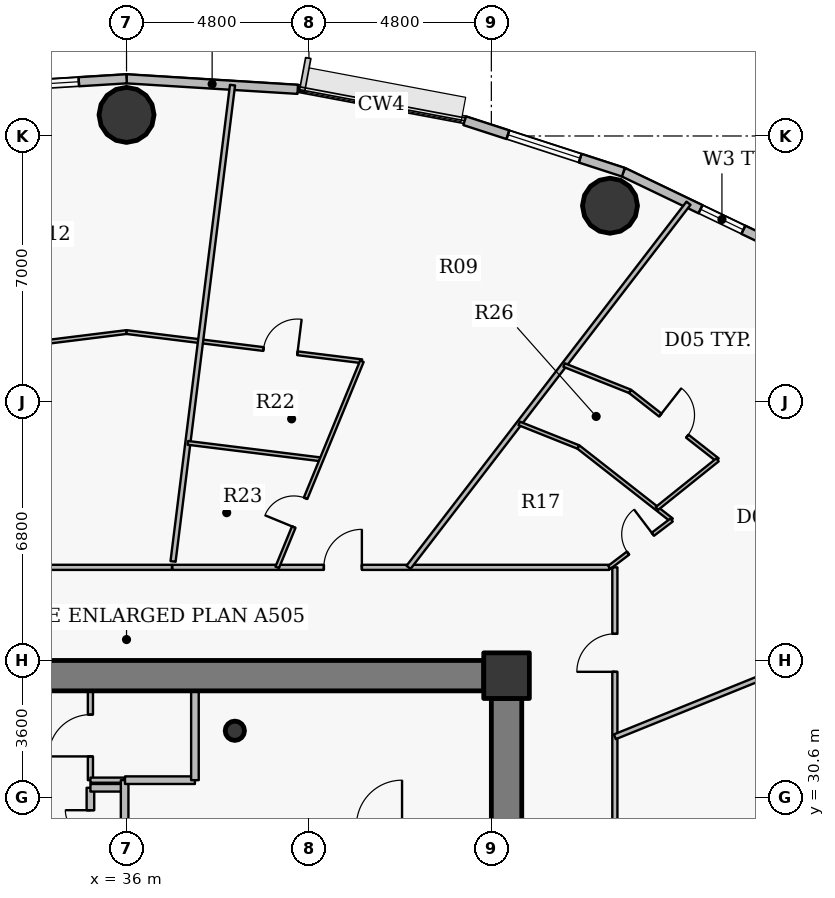
"""IFC4 building model, lengths in metres.
Left out: names, types, materials, properties, quantities, classifications, styles, units other than length and angle.
Written with IfcOpenShell. Run it as: python <this file> out.ifc"""

import sys

from ifc_helpers import new_model, si_unit, direction, frame, frame_2d, origin, origin_2d, place, context, subcontext, project, spatial, rectangle, hollow_circle, extrude, source, transform, mapped, element, fill, save


model = new_model("IFC4")
c1 = context("Model", 3, precision=1e-05, world=origin(), true_north=direction((0.0, 1.0)))
c2 = subcontext(c1, "Body", "Model", "MODEL_VIEW")
j1 = project(units=[si_unit("LENGTHUNIT", "METRE"), si_unit("PLANEANGLEUNIT", "RADIAN")], contexts=[c1])
p1 = place(None, origin())
s1 = spatial("IfcSite", under=j1, at=p1, CompositionType="ELEMENT")
p2 = place(p1, origin())
s2 = spatial("IfcBuilding", under=s1, at=p2, CompositionType="ELEMENT")
p3 = place(p2, frame((0.0, 0.0, 104.7)))
s3 = spatial("IfcBuildingStorey", under=s2, at=p3, CompositionType="ELEMENT", Elevation=104.7)
p4 = place(p3, frame((46.0, 33.8, 0.0), z_axis=(0.0, 0.0, 1.0), x_axis=(1.0, 0.0, 0.0)))
e1 = element("IfcColumn", 1, at=p4, inside=s3, PredefinedType="COLUMN", context=c2, shape_type="SweptSolid", body=[
    extrude(rectangle(XDim=1.2, YDim=1.2, at=origin_2d()), origin(), (0.0, 0.0, 1.0), 3.75),
])
p5 = place(p3, frame((38.85, 32.35, 0.0), z_axis=(0.0, 0.0, 1.0), x_axis=(1.0, 0.0, 0.0)))
e2 = element("IfcColumn", 2, at=p5, inside=s3, PredefinedType="COLUMN", context=c2, shape_type="SweptSolid", body=[
    extrude(hollow_circle(Radius=0.254, WallThickness=0.02, at=origin_2d()), origin(), (0.0, 0.0, 1.0), 3.75),
])
p6 = place(p3, frame((26.6, 33.8, 0.0), z_axis=(0.0, 0.0, 1.0), x_axis=(1.0, 0.0, 0.0)))
e3 = element("IfcWall", 3, at=p6, inside=s3, PredefinedType="SHEAR", context=c2, shape_type="SweptSolid", body=[
    extrude(rectangle(XDim=18.8, YDim=0.8, at=frame_2d((9.4, 0.0))), origin(), (0.0, 0.0, 1.0), 2.95),
])
p7 = place(p3, frame((46.0, 33.2, 0.0), z_axis=(0.0, 0.0, 1.0), x_axis=(0.0, -1.0, 0.0)))
e4 = element("IfcWall", 4, at=p7, inside=s3, PredefinedType="SHEAR", context=c2, shape_type="SweptSolid", body=[
    extrude(rectangle(XDim=12.4, YDim=0.8, at=frame_2d((6.2, 0.0))), origin(), (0.0, 0.0, 1.0), 2.95),
])
p8 = place(p7, frame((5.79, 0.0, 0.0)))
e5 = element("IfcOpeningElement", 5, at=p8, cuts=e4, PredefinedType="OPENING", context=c2, shape_type="SweptSolid", body=[
    extrude(rectangle(XDim=0.82, YDim=2.1, at=origin_2d()), frame((0.41, 0.41, 1.05), z_axis=(0.0, -1.0, 0.0), x_axis=(1.0, 0.0, 0.0)), (0.0, 0.0, 1.0), 0.82),
])
for number, where, z_axis, x_axis in (
    (6, (48.722, 46.165, 0.0), (0.0, 0.0, 1.0), (1.0, 0.0, 0.0)),
    (7, (36.0, 48.555, 0.0), (0.0, 0.0, 1.0), (1.0, 0.0, 0.0)),
):
    element("IfcColumn", number, at=place(p3, frame(where, z_axis=z_axis, x_axis=x_axis)), inside=s3, PredefinedType="COLUMN", context=c2, shape_type="SweptSolid", body=[
        extrude(hollow_circle(Radius=0.725, WallThickness=0.042, at=origin_2d()), origin(), (0.0, 0.0, 1.0), 3.75),
    ])
p9 = place(p3, frame((49.074, 47.047, 0.0), z_axis=(0.0, 0.0, 1.0), x_axis=(0.901589935876, -0.432591709962, 0.0)))
e8 = element("IfcWall", 8, at=p9, inside=s3, PredefinedType="SOLIDWALL", context=c2, shape_type="SweptSolid", body=[
    extrude(rectangle(XDim=4.272, YDim=0.24, at=frame_2d((2.136, 0.0))), origin(), (0.0, 0.0, 1.0), 3.5),
])
p10 = place(p9, frame((2.252, 0.0, 0.9)))
e9 = element("IfcOpeningElement", 9, at=p10, cuts=e8, PredefinedType="OPENING", context=c2, shape_type="SweptSolid", body=[
    extrude(rectangle(XDim=1.25, YDim=1.65, at=origin_2d()), frame((0.625, 0.13, 0.825), z_axis=(0.0, -1.0, 0.0), x_axis=(1.0, 0.0, 0.0)), (0.0, 0.0, 1.0), 0.26),
])
p11 = place(p3, frame((44.9, 48.401, 0.0), z_axis=(0.0, 0.0, 1.0), x_axis=(0.951211346073, -0.308540070495, 0.0)))
e10 = element("IfcWall", 10, at=p11, inside=s3, PredefinedType="SOLIDWALL", context=c2, shape_type="SweptSolid", body=[
    extrude(rectangle(XDim=4.388, YDim=0.24, at=frame_2d((2.194, 0.0))), origin(), (0.0, 0.0, 1.0), 3.5),
])
p12 = place(p11, frame((1.194, 0.0, 0.9)))
e11 = element("IfcOpeningElement", 11, at=p12, cuts=e10, PredefinedType="OPENING", context=c2, shape_type="SweptSolid", body=[
    extrude(rectangle(XDim=2.0, YDim=1.75, at=origin_2d()), frame((1.0, 0.13, 0.875), z_axis=(0.0, -1.0, 0.0), x_axis=(1.0, 0.0, 0.0)), (0.0, 0.0, 1.0), 0.26),
])
p13 = place(p3, frame((36.0, 49.505, 0.0), z_axis=(0.0, 0.0, 1.0), x_axis=(0.998107531589, -0.061492726276, 0.0)))
e12 = element("IfcWall", 12, at=p13, inside=s3, PredefinedType="SOLIDWALL", context=c2, shape_type="SweptSolid", body=[
    extrude(rectangle(XDim=4.514, YDim=0.24, at=frame_2d((2.257, 0.0))), origin(), (0.0, 0.0, 1.0), 3.5),
])
p14 = place(p3, frame((31.494, 49.227, 0.0), z_axis=(0.0, 0.0, 1.0), x_axis=(0.998107531589, 0.061492726276, 0.0)))
e13 = element("IfcWall", 13, at=p14, inside=s3, PredefinedType="SOLIDWALL", context=c2, shape_type="SweptSolid", body=[
    extrude(rectangle(XDim=4.514, YDim=0.24, at=frame_2d((2.257, 0.0))), origin(), (0.0, 0.0, 1.0), 3.5),
])
p15 = place(p14, frame((1.257, 0.0, 0.9)))
e14 = element("IfcOpeningElement", 14, at=p15, cuts=e13, PredefinedType="OPENING", context=c2, shape_type="SweptSolid", body=[
    extrude(rectangle(XDim=2.0, YDim=1.75, at=origin_2d()), frame((1.0, 0.13, 0.875), z_axis=(0.0, -1.0, 0.0), x_axis=(1.0, 0.0, 0.0)), (0.0, 0.0, 1.0), 0.26),
])
p16 = place(p3, frame((31.416, 42.272, 0.0), z_axis=(0.0, 0.0, 1.0), x_axis=(0.992393726446, 0.12310439355, 0.0)))
e15 = element("IfcWall", 15, at=p16, inside=s3, PredefinedType="PARTITIONING", context=c2, shape_type="SweptSolid", body=[
    extrude(rectangle(XDim=4.619, YDim=0.1, at=frame_2d((2.31, 0.0))), origin(), (0.0, 0.0, 1.0), 2.935),
])
p17 = place(p3, frame((35.05, 27.25, 0.0), z_axis=(0.0, 0.0, 1.0), x_axis=(0.0, 1.0, 0.0)))
e16 = element("IfcWall", 16, at=p17, inside=s3, PredefinedType="PARTITIONING", context=c2, shape_type="SweptSolid", body=[
    extrude(rectangle(XDim=3.6, YDim=0.2, at=frame_2d((1.8, 0.0))), origin(), (0.0, 0.0, 1.0), 3.5),
])
p18 = place(p17, frame((0.59, 0.0, 0.0)))
e17 = element("IfcOpeningElement", 17, at=p18, cuts=e16, PredefinedType="OPENING", context=c2, shape_type="SweptSolid", body=[
    extrude(rectangle(XDim=0.66, YDim=2.05, at=origin_2d()), frame((0.33, 0.11, 1.025), z_axis=(0.0, -1.0, 0.0), x_axis=(1.0, 0.0, 0.0)), (0.0, 0.0, 1.0), 0.22),
])
p19 = place(p17, frame((2.35, 0.0, 0.0)))
e18 = element("IfcOpeningElement", 18, at=p19, cuts=e16, PredefinedType="OPENING", context=c2, shape_type="SweptSolid", body=[
    extrude(rectangle(XDim=0.66, YDim=2.05, at=origin_2d()), frame((0.33, 0.11, 1.025), z_axis=(0.0, -1.0, 0.0), x_axis=(1.0, 0.0, 0.0)), (0.0, 0.0, 1.0), 0.22),
])
p20 = place(p3, frame((35.05, 30.85, 0.0), z_axis=(0.0, 0.0, 1.0), x_axis=(1.0, 0.0, 0.0)))
e19 = element("IfcWall", 19, at=p20, inside=s3, PredefinedType="PARTITIONING", context=c2, shape_type="SweptSolid", body=[
    extrude(rectangle(XDim=0.9, YDim=0.2, at=frame_2d((0.45, 0.0))), origin(), (0.0, 0.0, 1.0), 3.5),
])
p21 = place(p3, frame((35.05, 31.05, 0.0), z_axis=(0.0, 0.0, 1.0), x_axis=(0.0, 1.0, 0.0)))
e20 = element("IfcWall", 20, at=p21, inside=s3, PredefinedType="PARTITIONING", context=c2, shape_type="SweptSolid", body=[
    extrude(rectangle(XDim=2.35, YDim=0.135, at=frame_2d((1.175, 0.0))), origin(), (0.0, 0.0, 1.0), 3.085),
])
p22 = place(p21, frame((0.625, 0.0, 0.0)))
e21 = element("IfcOpeningElement", 21, at=p22, cuts=e20, PredefinedType="OPENING", context=c2, shape_type="SweptSolid", body=[
    extrude(rectangle(XDim=1.1, YDim=2.15, at=origin_2d()), frame((0.55, 0.078, 1.075), z_axis=(0.0, -1.0, 0.0), x_axis=(1.0, 0.0, 0.0)), (0.0, 0.0, 1.0), 0.155),
])
p23 = place(p3, frame((35.05, 31.05, 0.0), z_axis=(0.0, 0.0, 1.0), x_axis=(1.0, 0.0, 0.0)))
e22 = element("IfcWall", 22, at=p23, inside=s3, PredefinedType="PARTITIONING", context=c2, shape_type="SweptSolid", body=[
    extrude(rectangle(XDim=0.9, YDim=0.135, at=frame_2d((0.45, 0.0))), origin(), (0.0, 0.0, 1.0), 3.5),
])
p24 = place(p3, frame((35.95, 27.25, 0.0), z_axis=(0.0, 0.0, 1.0), x_axis=(0.0, 1.0, 0.0)))
e23 = element("IfcWall", 23, at=p24, inside=s3, PredefinedType="PARTITIONING", context=c2, shape_type="SweptSolid", body=[
    extrude(rectangle(XDim=3.8, YDim=0.2, at=frame_2d((1.9, 0.0))), origin(), (0.0, 0.0, 1.0), 3.5),
])
p25 = place(p3, frame((35.96, 31.05, 0.0), z_axis=(0.0, 0.0, 1.0), x_axis=(1.0, 0.0, 0.0)))
e24 = element("IfcWall", 24, at=p25, inside=s3, PredefinedType="PARTITIONING", context=c2, shape_type="SweptSolid", body=[
    extrude(rectangle(XDim=1.84, YDim=0.2, at=frame_2d((0.92, 0.0))), origin(), (0.0, 0.0, 1.0), 3.5),
])
p26 = place(p3, frame((36.0, 42.841, 0.0), z_axis=(0.0, 0.0, 1.0), x_axis=(0.992393593066, -0.123105468776, 0.0)))
e25 = element("IfcWall", 25, at=p26, inside=s3, PredefinedType="PARTITIONING", context=c2, shape_type="SweptSolid", body=[
    extrude(rectangle(XDim=6.241, YDim=0.1, at=frame_2d((3.121, 0.0))), origin(), (0.0, 0.0, 1.0), 2.935),
])
p27 = place(p26, frame((3.632, 0.0, 0.0)))
e26 = element("IfcOpeningElement", 26, at=p27, cuts=e25, PredefinedType="OPENING", context=c2, shape_type="SweptSolid", body=[
    extrude(rectangle(XDim=0.9, YDim=2.1, at=origin_2d()), frame((0.45, 0.06, 1.05), z_axis=(0.0, -1.0, 0.0), x_axis=(1.0, 0.0, 0.0)), (0.0, 0.0, 1.0), 0.12),
])
p28 = place(p3, frame((37.205, 36.65, 0.0), z_axis=(0.0, 0.0, 1.0), x_axis=(1.0, 0.0, 0.0)))
e27 = element("IfcWall", 27, at=p28, inside=s3, PredefinedType="PARTITIONING", context=c2, shape_type="SweptSolid", body=[
    extrude(rectangle(XDim=11.499, YDim=0.135, at=frame_2d((5.75, 0.0))), origin(), (0.0, 0.0, 1.0), 2.935),
])
p29 = place(p28, frame((3.988, 0.0, 0.0)))
e28 = element("IfcOpeningElement", 28, at=p29, cuts=e27, PredefinedType="OPENING", context=c2, shape_type="SweptSolid", body=[
    extrude(rectangle(XDim=1.0, YDim=2.15, at=origin_2d()), frame((0.5, 0.078, 1.075), z_axis=(0.0, -1.0, 0.0), x_axis=(1.0, 0.0, 0.0)), (0.0, 0.0, 1.0), 0.155),
])
p30 = place(p3, frame((37.224, 36.805, 0.0), z_axis=(0.0, 0.0, 1.0), x_axis=(0.123906262398, 0.992293927291, 0.0)))
e29 = element("IfcWall", 29, at=p30, inside=s3, PredefinedType="PARTITIONING", context=c2, shape_type="SweptSolid", body=[
    extrude(rectangle(XDim=12.63, YDim=0.135, at=frame_2d((6.315, 0.0))), origin(), (0.0, 0.0, 1.0), 2.935),
])
p31 = place(p3, frame((37.614, 39.925, 0.0), z_axis=(0.0, 0.0, 1.0), x_axis=(0.992397148182, -0.123076806427, 0.0)))
e30 = element("IfcWall", 30, at=p31, inside=s3, PredefinedType="PARTITIONING", context=c2, shape_type="SweptSolid", body=[
    extrude(rectangle(XDim=3.545, YDim=0.1, at=frame_2d((1.772, 0.0))), origin(), (0.0, 0.0, 1.0), 3.5),
])
p32 = place(p3, frame((37.8, 31.05, 0.0), z_axis=(0.0, 0.0, 1.0), x_axis=(0.0, 1.0, 0.0)))
e31 = element("IfcWall", 31, at=p32, inside=s3, PredefinedType="PARTITIONING", context=c2, shape_type="SweptSolid", body=[
    extrude(rectangle(XDim=2.35, YDim=0.2, at=frame_2d((1.175, 0.0))), origin(), (0.0, 0.0, 1.0), 3.085),
])
p33 = place(p3, frame((39.965, 36.65, 0.0), z_axis=(0.0, 0.0, 1.0), x_axis=(0.380069011115, 0.924958132452, 0.0)))
e32 = element("IfcWall", 32, at=p33, inside=s3, PredefinedType="PARTITIONING", context=c2, shape_type="SweptSolid", body=[
    extrude(rectangle(XDim=5.863, YDim=0.1, at=frame_2d((2.931, 0.0))), origin(), (0.0, 0.0, 1.0), 3.5),
])
p34 = place(p33, frame((1.145, 0.0, 0.0)))
e33 = element("IfcOpeningElement", 33, at=p34, cuts=e32, PredefinedType="OPENING", context=c2, shape_type="SweptSolid", body=[
    extrude(rectangle(XDim=0.82, YDim=2.1, at=origin_2d()), frame((0.41, 0.06, 1.05), z_axis=(0.0, -1.0, 0.0), x_axis=(1.0, 0.0, 0.0)), (0.0, 0.0, 1.0), 0.12),
])
p35 = place(p3, frame((43.42, 36.65, 0.0), z_axis=(0.0, 0.0, 1.0), x_axis=(0.609572126114, 0.792730611913, 0.0)))
e34 = element("IfcWall", 34, at=p35, inside=s3, PredefinedType="PARTITIONING", context=c2, shape_type="SweptSolid", body=[
    extrude(rectangle(XDim=12.086, YDim=0.135, at=frame_2d((6.043, 0.0))), origin(), (0.0, 0.0, 1.0), 2.935),
])
p36 = place(p3, frame((46.333, 40.437, 0.0), z_axis=(0.0, 0.0, 1.0), x_axis=(0.928817558248, -0.370537371247, 0.0)))
e35 = element("IfcWall", 35, at=p36, inside=s3, PredefinedType="PARTITIONING", context=c2, shape_type="SweptSolid", body=[
    extrude(rectangle(XDim=1.677, YDim=0.1, at=frame_2d((0.839, 0.0))), origin(), (0.0, 0.0, 1.0), 3.085),
])
p37 = place(p3, frame((47.514, 41.973, 0.0), z_axis=(0.0, 0.0, 1.0), x_axis=(0.928809612726, -0.370557287485, 0.0)))
e36 = element("IfcWall", 36, at=p37, inside=s3, PredefinedType="PARTITIONING", context=c2, shape_type="SweptSolid", body=[
    extrude(rectangle(XDim=1.869, YDim=0.1, at=frame_2d((0.935, 0.0))), origin(), (0.0, 0.0, 1.0), 3.5),
])
p38 = place(p3, frame((47.891, 39.816, 0.0), z_axis=(0.0, 0.0, 1.0), x_axis=(0.787339621997, -0.616519520887, 0.0)))
e37 = element("IfcWall", 37, at=p38, inside=s3, PredefinedType="PARTITIONING", context=c2, shape_type="SweptSolid", body=[
    extrude(rectangle(XDim=3.116, YDim=0.1, at=frame_2d((1.558, 0.0))), origin(), (0.0, 0.0, 1.0), 2.935),
])
p39 = place(p3, frame((48.704, 36.65, 0.0), z_axis=(0.0, 0.0, 1.0), x_axis=(0.796299280247, 0.604902848628, 0.0)))
e38 = element("IfcWall", 38, at=p39, inside=s3, PredefinedType="PARTITIONING", context=c2, shape_type="SweptSolid", body=[
    extrude(rectangle(XDim=2.059, YDim=0.1, at=frame_2d((1.029, 0.0))), origin(), (0.0, 0.0, 1.0), 2.935),
])
p40 = place(p39, frame((0.619, 0.0, 0.0)))
e39 = element("IfcOpeningElement", 39, at=p40, cuts=e38, PredefinedType="OPENING", context=c2, shape_type="SweptSolid", body=[
    extrude(rectangle(XDim=0.82, YDim=2.1, at=origin_2d()), frame((0.41, 0.06, 1.05), z_axis=(0.0, -1.0, 0.0), x_axis=(1.0, 0.0, 0.0)), (0.0, 0.0, 1.0), 0.12),
])
p41 = place(p3, frame((48.85, 17.35, 0.0), z_axis=(0.0, 0.0, 1.0), x_axis=(0.0, 1.0, 0.0)))
e40 = element("IfcWall", 40, at=p41, inside=s3, PredefinedType="PARTITIONING", context=c2, shape_type="SweptSolid", body=[
    extrude(rectangle(XDim=19.3, YDim=0.135, at=frame_2d((9.65, 0.0))), origin(), (0.0, 0.0, 1.0), 2.935),
])
p42 = place(p41, frame((16.551, 0.0, 0.0)))
e41 = element("IfcOpeningElement", 41, at=p42, cuts=e40, PredefinedType="OPENING", context=c2, shape_type="SweptSolid", body=[
    extrude(rectangle(XDim=1.0, YDim=2.15, at=origin_2d()), frame((0.5, 0.078, 1.075), z_axis=(0.0, -1.0, 0.0), x_axis=(1.0, 0.0, 0.0)), (0.0, 0.0, 1.0), 0.155),
])
p43 = place(p41, frame((8.753, 0.0, 0.0)))
e42 = element("IfcOpeningElement", 42, at=p43, cuts=e40, PredefinedType="OPENING", context=c2, shape_type="SweptSolid", body=[
    extrude(rectangle(XDim=1.0, YDim=2.15, at=origin_2d()), frame((0.5, 0.078, 1.075), z_axis=(0.0, -1.0, 0.0), x_axis=(1.0, 0.0, 0.0)), (0.0, 0.0, 1.0), 0.155),
])
p44 = place(p3, frame((48.85, 32.192, 0.0), z_axis=(0.0, 0.0, 1.0), x_axis=(0.927181163505, 0.374613253958, 0.0)))
e43 = element("IfcWall", 43, at=p44, inside=s3, PredefinedType="PARTITIONING", context=c2, shape_type="SweptSolid", body=[
    extrude(rectangle(XDim=13.706, YDim=0.135, at=frame_2d((6.853, 0.0))), origin(), (0.0, 0.0, 1.0), 2.935),
])
p45 = place(p3, frame((49.25, 41.28, 0.0), z_axis=(0.0, 0.0, 1.0), x_axis=(0.787360471536, -0.616492893602, 0.0)))
e44 = element("IfcWall", 44, at=p45, inside=s3, PredefinedType="PARTITIONING", context=c2, shape_type="SweptSolid", body=[
    extrude(rectangle(XDim=2.923, YDim=0.1, at=frame_2d((1.462, 0.0))), origin(), (0.0, 0.0, 1.0), 3.5),
])
p46 = place(p45, frame((1.012, 0.0, 0.0)))
e45 = element("IfcOpeningElement", 45, at=p46, cuts=e44, PredefinedType="OPENING", context=c2, shape_type="SweptSolid", body=[
    extrude(rectangle(XDim=0.9, YDim=2.1, at=origin_2d()), frame((0.45, 0.06, 1.05), z_axis=(0.0, -1.0, 0.0), x_axis=(1.0, 0.0, 0.0)), (0.0, 0.0, 1.0), 0.12),
])
p47 = place(p3, frame((49.956, 38.198, 0.0), z_axis=(0.0, 0.0, 1.0), x_axis=(0.78000622602, 0.625771753413, 0.0)))
e46 = element("IfcWall", 46, at=p47, inside=s3, PredefinedType="PARTITIONING", context=c2, shape_type="SweptSolid", body=[
    extrude(rectangle(XDim=2.045, YDim=0.1, at=frame_2d((1.022, 0.0))), origin(), (0.0, 0.0, 1.0), 3.085),
])
p48 = place(p3, frame((33.533, 36.65, 0.0), z_axis=(0.0, 0.0, 1.0), x_axis=(1.0, 0.0, 0.0)))
e47 = element("IfcWall", 47, at=p48, inside=s3, PredefinedType="PARTITIONING", context=c2, shape_type="SweptSolid", body=[
    extrude(rectangle(XDim=3.662, YDim=0.135, at=frame_2d((1.831, 0.0))), origin(), (0.0, 0.0, 1.0), 2.935),
])
p49 = place(p3, frame((46.4, 34.2, 0.0), z_axis=(0.0, 0.0, 1.0), x_axis=(-1.0, 0.0, 0.0)))
e48 = element("IfcWall", 48, at=p49, inside=s3, PredefinedType="PARTITIONING", context=c2, shape_type="SweptSolid", body=[
    extrude(rectangle(XDim=0.99, YDim=0.135, at=frame_2d((0.495, 0.0))), origin(), (0.0, 0.0, 1.0), 2.935),
])
p50 = place(p3, frame((46.4, 33.21, 0.0), z_axis=(0.0, 0.0, 1.0), x_axis=(0.0, 1.0, 0.0)))
e49 = element("IfcWall", 49, at=p50, inside=s3, PredefinedType="PARTITIONING", context=c2, shape_type="SweptSolid", body=[
    extrude(rectangle(XDim=0.683, YDim=0.135, at=frame_2d((0.341, 0.0))), origin(), (0.0, 0.0, 1.0), 3.5),
])
m1 = source(origin(), c2, "Body", "SweptSolid", [
    extrude(rectangle(XDim=1.25, YDim=1.65, at=origin_2d()), frame((0.625, 0.03, 0.825), z_axis=(0.0, -1.0, 0.0), x_axis=(1.0, 0.0, 0.0)), (0.0, 0.0, 1.0), 0.06),
])
p51 = place(p10, origin())
e50 = element("IfcWindow", 50, at=p51, inside=s3, PartitioningType="SINGLE_PANEL", PredefinedType="WINDOW", context=c2, shape_type="MappedRepresentation", body=[
    mapped(m1, transform((0.0, 0.0, 0.0), x_axis=(1.0, 0.0, 0.0), y_axis=(0.0, 1.0, 0.0), z_axis=(0.0, 0.0, 1.0), scale=1.0)),
])
fill(e9, e50)
m2 = source(origin(), c2, "Body", "SweptSolid", [
    extrude(rectangle(XDim=2.0, YDim=1.75, at=origin_2d()), frame((1.0, 0.03, 0.875), z_axis=(0.0, -1.0, 0.0), x_axis=(1.0, 0.0, 0.0)), (0.0, 0.0, 1.0), 0.06),
])
p52 = place(p12, origin())
e51 = element("IfcWindow", 51, at=p52, inside=s3, PartitioningType="DOUBLE_PANEL_VERTICAL", PredefinedType="WINDOW", context=c2, shape_type="MappedRepresentation", body=[
    mapped(m2, transform((0.0, 0.0, 0.0), x_axis=(1.0, 0.0, 0.0), y_axis=(0.0, 1.0, 0.0), z_axis=(0.0, 0.0, 1.0), scale=1.0)),
])
fill(e11, e51)
p53 = place(p15, origin())
e52 = element("IfcWindow", 52, at=p53, inside=s3, PartitioningType="DOUBLE_PANEL_VERTICAL", PredefinedType="WINDOW", context=c2, shape_type="MappedRepresentation", body=[
    mapped(m2, transform((0.0, 0.0, 0.0), x_axis=(1.0, 0.0, 0.0), y_axis=(0.0, 1.0, 0.0), z_axis=(0.0, 0.0, 1.0), scale=1.0)),
])
fill(e14, e52)
m3 = source(origin(), c2, "Body", "SweptSolid", [
    extrude(rectangle(XDim=1.0, YDim=2.15, at=origin_2d()), frame((0.5, 0.025, 1.075), z_axis=(0.0, -1.0, 0.0), x_axis=(1.0, 0.0, 0.0)), (0.0, 0.0, 1.0), 0.05),
])
p54 = place(p42, origin())
e53 = element("IfcDoor", 53, at=p54, inside=s3, OperationType="SINGLE_SWING_LEFT", PredefinedType="DOOR", context=c2, shape_type="MappedRepresentation", body=[
    mapped(m3, transform((0.0, 0.0, 0.0), x_axis=(1.0, 0.0, 0.0), y_axis=(0.0, 1.0, 0.0), z_axis=(0.0, 0.0, 1.0), scale=1.0)),
])
fill(e41, e53)
m4 = source(origin(), c2, "Body", "SweptSolid", [
    extrude(rectangle(XDim=0.82, YDim=2.1, at=origin_2d()), frame((0.41, 0.025, 1.05), z_axis=(0.0, -1.0, 0.0), x_axis=(1.0, 0.0, 0.0)), (0.0, 0.0, 1.0), 0.05),
])
p55 = place(p40, origin())
e54 = element("IfcDoor", 54, at=p55, inside=s3, OperationType="SINGLE_SWING_RIGHT", PredefinedType="DOOR", context=c2, shape_type="MappedRepresentation", body=[
    mapped(m4, transform((0.0, 0.0, 0.0), x_axis=(1.0, 0.0, 0.0), y_axis=(0.0, 1.0, 0.0), z_axis=(0.0, 0.0, 1.0), scale=1.0)),
])
fill(e39, e54)
m5 = source(origin(), c2, "Body", "SweptSolid", [
    extrude(rectangle(XDim=0.9, YDim=2.1, at=origin_2d()), frame((0.45, 0.025, 1.05), z_axis=(0.0, -1.0, 0.0), x_axis=(1.0, 0.0, 0.0)), (0.0, 0.0, 1.0), 0.05),
])
p56 = place(p46, origin())
e55 = element("IfcDoor", 55, at=p56, inside=s3, OperationType="SINGLE_SWING_LEFT", PredefinedType="DOOR", context=c2, shape_type="MappedRepresentation", body=[
    mapped(m5, transform((0.0, 0.0, 0.0), x_axis=(1.0, 0.0, 0.0), y_axis=(0.0, 1.0, 0.0), z_axis=(0.0, 0.0, 1.0), scale=1.0)),
])
fill(e45, e55)
p57 = place(p29, origin())
e56 = element("IfcDoor", 56, at=p57, inside=s3, OperationType="SINGLE_SWING_RIGHT", PredefinedType="DOOR", context=c2, shape_type="MappedRepresentation", body=[
    mapped(m3, transform((0.0, 0.0, 0.0), x_axis=(1.0, 0.0, 0.0), y_axis=(0.0, 1.0, 0.0), z_axis=(0.0, 0.0, 1.0), scale=1.0)),
])
fill(e28, e56)
p58 = place(p34, origin())
e57 = element("IfcDoor", 57, at=p58, inside=s3, OperationType="SINGLE_SWING_LEFT", PredefinedType="DOOR", context=c2, shape_type="MappedRepresentation", body=[
    mapped(m4, transform((0.0, 0.0, 0.0), x_axis=(1.0, 0.0, 0.0), y_axis=(0.0, 1.0, 0.0), z_axis=(0.0, 0.0, 1.0), scale=1.0)),
])
fill(e33, e57)
p59 = place(p27, origin())
e58 = element("IfcDoor", 58, at=p59, inside=s3, OperationType="SINGLE_SWING_RIGHT", PredefinedType="DOOR", context=c2, shape_type="MappedRepresentation", body=[
    mapped(m5, transform((0.0, 0.0, 0.0), x_axis=(1.0, 0.0, 0.0), y_axis=(0.0, 1.0, 0.0), z_axis=(0.0, 0.0, 1.0), scale=1.0)),
])
fill(e26, e58)
m6 = source(origin(), c2, "Body", "SweptSolid", [
    extrude(rectangle(XDim=0.66, YDim=2.05, at=origin_2d()), frame((0.33, 0.025, 1.025), z_axis=(0.0, -1.0, 0.0), x_axis=(1.0, 0.0, 0.0)), (0.0, 0.0, 1.0), 0.05),
])
p60 = place(p19, origin())
e59 = element("IfcDoor", 59, at=p60, inside=s3, OperationType="SINGLE_SWING_RIGHT", PredefinedType="USERDEFINED", context=c2, shape_type="MappedRepresentation", body=[
    mapped(m6, transform((0.0, 0.0, 0.0), x_axis=(1.0, 0.0, 0.0), y_axis=(0.0, 1.0, 0.0), z_axis=(0.0, 0.0, 1.0), scale=1.0)),
])
fill(e18, e59)
m7 = source(origin(), c2, "Body", "SweptSolid", [
    extrude(rectangle(XDim=1.1, YDim=2.15, at=origin_2d()), frame((0.55, 0.025, 1.075), z_axis=(0.0, -1.0, 0.0), x_axis=(1.0, 0.0, 0.0)), (0.0, 0.0, 1.0), 0.05),
])
p61 = place(p22, origin())
e60 = element("IfcDoor", 60, at=p61, inside=s3, OperationType="SINGLE_SWING_LEFT", PredefinedType="DOOR", context=c2, shape_type="MappedRepresentation", body=[
    mapped(m7, transform((0.0, 0.0, 0.0), x_axis=(1.0, 0.0, 0.0), y_axis=(0.0, 1.0, 0.0), z_axis=(0.0, 0.0, 1.0), scale=1.0)),
])
fill(e21, e60)
save(model, sys.argv[1])
